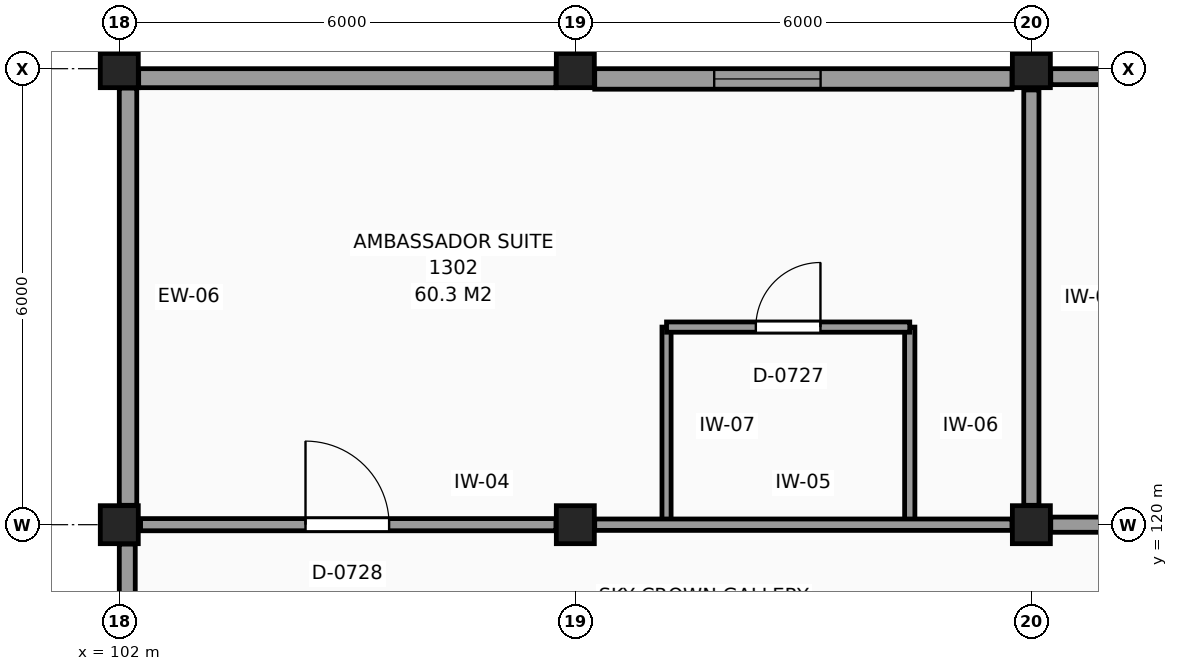
"""IFC4 building model, lengths in metres.
Left out: names, types, materials, properties, quantities, classifications, styles, units other than length and angle.
Written with IfcOpenShell. Run it as: python <this file> out.ifc"""

import sys

from ifc_helpers import new_model, si_unit, direction, frame, frame_2d, origin, origin_2d, place, context, subcontext, project, spatial, rectangle, extrude, element, fill, save


model = new_model("IFC4")
c1 = context("Model", 3, precision=1e-05, world=origin(), true_north=direction((0.0, 1.0)))
c2 = subcontext(c1, "Body", "Model", "MODEL_VIEW")
j1 = project(units=[si_unit("LENGTHUNIT", "METRE"), si_unit("PLANEANGLEUNIT", "RADIAN")], contexts=[c1])
p1 = place(None, origin())
s1 = spatial("IfcSite", under=j1, at=p1, CompositionType="ELEMENT")
p2 = place(p1, origin())
s2 = spatial("IfcBuilding", under=s1, at=p2, CompositionType="ELEMENT")
p3 = place(p2, frame((0.0, 0.0, 51.3)))
s3 = spatial("IfcBuildingStorey", under=s2, at=p3, CompositionType="ELEMENT", Elevation=51.3)
for number, where, z_axis, x_axis in (
    (1, (102.0, 120.0, 0.0), (0.0, 0.0, 1.0), (1.0, 0.0, 0.0)),
    (2, (102.0, 126.0, 0.0), (0.0, 0.0, 1.0), (1.0, 0.0, 0.0)),
    (3, (108.0, 120.0, 0.0), (0.0, 0.0, 1.0), (1.0, 0.0, 0.0)),
    (4, (108.0, 126.0, 0.0), (0.0, 0.0, 1.0), (1.0, 0.0, 0.0)),
    (5, (114.0, 120.0, 0.0), (0.0, 0.0, 1.0), (1.0, 0.0, 0.0)),
    (6, (114.0, 126.0, 0.0), (0.0, 0.0, 1.0), (1.0, 0.0, 0.0)),
):
    element("IfcColumn", number, at=place(p3, frame(where, z_axis=z_axis, x_axis=x_axis)), inside=s3, PredefinedType="COLUMN", context=c2, shape_type="SweptSolid", body=[
        extrude(rectangle(XDim=0.5, YDim=0.5, at=origin_2d()), origin(), (0.0, 0.0, 1.0), 3.3),
    ])
p4 = place(p3, frame((119.745, 125.895, 0.0), z_axis=(0.0, 0.0, 1.0), x_axis=(-1.0, 0.0, 0.0)))
e7 = element("IfcWall", 7, at=p4, inside=s3, PredefinedType="SOLIDWALL", context=c2, shape_type="SweptSolid", body=[
    extrude(rectangle(XDim=5.49, YDim=0.21, at=frame_2d((2.745, 0.0))), origin(), (0.0, 0.0, 1.0), 2.62),
])
p5 = place(p3, frame((113.745, 125.865, 0.0), z_axis=(0.0, 0.0, 1.0), x_axis=(-1.0, 0.0, 0.0)))
e8 = element("IfcWall", 8, at=p5, inside=s3, PredefinedType="SOLIDWALL", context=c2, shape_type="SweptSolid", body=[
    extrude(rectangle(XDim=5.49, YDim=0.27, at=frame_2d((2.745, 0.0))), origin(), (0.0, 0.0, 1.0), 2.51),
])
p6 = place(p5, frame((2.518, 0.0, 0.8)))
e9 = element("IfcOpeningElement", 9, at=p6, cuts=e8, PredefinedType="OPENING", context=c2, shape_type="SweptSolid", body=[
    extrude(rectangle(XDim=1.4, YDim=1.4, at=frame_2d((0.7, 0.7))), frame((0.0, 0.145, 0.0), z_axis=(0.0, -1.0, 0.0), x_axis=(1.0, 0.0, 0.0)), (0.0, 0.0, 1.0), 0.29),
])
p7 = place(p3, frame((107.745, 125.875, 0.0), z_axis=(0.0, 0.0, 1.0), x_axis=(-1.0, 0.0, 0.0)))
e10 = element("IfcWall", 10, at=p7, inside=s3, PredefinedType="SOLIDWALL", context=c2, shape_type="SweptSolid", body=[
    extrude(rectangle(XDim=5.49, YDim=0.25, at=frame_2d((2.745, 0.0))), origin(), (0.0, 0.0, 1.0), 2.62),
])
p8 = place(p3, frame((102.115, 125.745, 0.0), z_axis=(0.0, 0.0, 1.0), x_axis=(0.0, -1.0, 0.0)))
e11 = element("IfcWall", 11, at=p8, inside=s3, PredefinedType="SOLIDWALL", context=c2, shape_type="SweptSolid", body=[
    extrude(rectangle(XDim=5.49, YDim=0.23, at=frame_2d((2.745, 0.0))), origin(), (0.0, 0.0, 1.0), 2.46),
])
p9 = place(p3, frame((102.105, 119.745, 0.0), z_axis=(0.0, 0.0, 1.0), x_axis=(0.0, -1.0, 0.0)))
e12 = element("IfcWall", 12, at=p9, inside=s3, PredefinedType="SOLIDWALL", context=c2, shape_type="SweptSolid", body=[
    extrude(rectangle(XDim=5.49, YDim=0.21, at=frame_2d((2.745, 0.0))), origin(), (0.0, 0.0, 1.0), 2.61),
])
p10 = place(p3, frame((109.2, 120.0, 0.0), z_axis=(0.0, 0.0, 1.0), x_axis=(0.0, 1.0, 0.0)))
e13 = element("IfcWall", 13, at=p10, inside=s3, PredefinedType="PARTITIONING", context=c2, shape_type="SweptSolid", body=[
    extrude(rectangle(XDim=2.6, YDim=0.12, at=frame_2d((1.3, 0.0))), origin(), (0.0, 0.0, 1.0), 3.06),
])
p11 = place(p3, frame((112.4, 120.0, 0.0), z_axis=(0.0, 0.0, 1.0), x_axis=(0.0, 1.0, 0.0)))
e14 = element("IfcWall", 14, at=p11, inside=s3, PredefinedType="PARTITIONING", context=c2, shape_type="SweptSolid", body=[
    extrude(rectangle(XDim=2.6, YDim=0.135, at=frame_2d((1.3, 0.0))), origin(), (0.0, 0.0, 1.0), 3.06),
])
p12 = place(p3, frame((114.0, 120.255, 0.0), z_axis=(0.0, 0.0, 1.0), x_axis=(0.0, 1.0, 0.0)))
e15 = element("IfcWall", 15, at=p12, inside=s3, PredefinedType="PARTITIONING", context=c2, shape_type="SweptSolid", body=[
    extrude(rectangle(XDim=5.465, YDim=0.2, at=frame_2d((2.732, 0.0))), origin(), (0.0, 0.0, 1.0), 2.46),
])
p13 = place(p3, frame((102.28, 120.0, 0.0), z_axis=(0.0, 0.0, 1.0), x_axis=(1.0, 0.0, 0.0)))
e16 = element("IfcWall", 16, at=p13, inside=s3, PredefinedType="PARTITIONING", context=c2, shape_type="SweptSolid", body=[
    extrude(rectangle(XDim=5.465, YDim=0.16, at=frame_2d((2.732, 0.0))), origin(), (0.0, 0.0, 1.0), 2.62),
])
p14 = place(p13, frame((2.17, 0.0, 0.0)))
e17 = element("IfcOpeningElement", 17, at=p14, cuts=e16, PredefinedType="OPENING", context=c2, shape_type="SweptSolid", body=[
    extrude(rectangle(XDim=1.1, YDim=2.2, at=frame_2d((0.55, 1.1))), frame((0.0, 0.09, 0.0), z_axis=(0.0, -1.0, 0.0), x_axis=(1.0, 0.0, 0.0)), (0.0, 0.0, 1.0), 0.18),
])
p15 = place(p3, frame((108.255, 120.0, 0.0), z_axis=(0.0, 0.0, 1.0), x_axis=(1.0, 0.0, 0.0)))
e18 = element("IfcWall", 18, at=p15, inside=s3, PredefinedType="PARTITIONING", context=c2, shape_type="SweptSolid", body=[
    extrude(rectangle(XDim=5.49, YDim=0.15, at=frame_2d((2.745, 0.0))), origin(), (0.0, 0.0, 1.0), 2.51),
])
p16 = place(p3, frame((114.255, 120.0, 0.0), z_axis=(0.0, 0.0, 1.0), x_axis=(1.0, 0.0, 0.0)))
e19 = element("IfcWall", 19, at=p16, inside=s3, PredefinedType="PARTITIONING", context=c2, shape_type="SweptSolid", body=[
    extrude(rectangle(XDim=5.49, YDim=0.2, at=frame_2d((2.745, 0.0))), origin(), (0.0, 0.0, 1.0), 2.62),
])
p17 = place(p16, frame((2.195, 0.0, 0.0)))
e20 = element("IfcOpeningElement", 20, at=p17, cuts=e19, PredefinedType="OPENING", context=c2, shape_type="SweptSolid", body=[
    extrude(rectangle(XDim=1.1, YDim=2.2, at=frame_2d((0.55, 1.1))), frame((0.0, 0.11, 0.0), z_axis=(0.0, -1.0, 0.0), x_axis=(1.0, 0.0, 0.0)), (0.0, 0.0, 1.0), 0.22),
])
p18 = place(p3, frame((109.2, 122.6, 0.0), z_axis=(0.0, 0.0, 1.0), x_axis=(1.0, 0.0, 0.0)))
e21 = element("IfcWall", 21, at=p18, inside=s3, PredefinedType="PARTITIONING", context=c2, shape_type="SweptSolid", body=[
    extrude(rectangle(XDim=3.2, YDim=0.135, at=frame_2d((1.6, 0.0))), origin(), (0.0, 0.0, 1.0), 3.06),
])
p19 = place(p18, frame((1.175, 0.0, 0.0)))
e22 = element("IfcOpeningElement", 22, at=p19, cuts=e21, PredefinedType="OPENING", context=c2, shape_type="SweptSolid", body=[
    extrude(rectangle(XDim=0.85, YDim=2.1, at=frame_2d((0.425, 1.05))), frame((0.0, 0.078, 0.0), z_axis=(0.0, -1.0, 0.0), x_axis=(1.0, 0.0, 0.0)), (0.0, 0.0, 1.0), 0.155),
])
p20 = place(p6, origin())
e23 = element("IfcWindow", 23, at=p20, inside=s3, PartitioningType="SINGLE_PANEL", PredefinedType="WINDOW", context=c2, shape_type="SweptSolid", body=[
    extrude(rectangle(XDim=1.4, YDim=1.4, at=frame_2d((0.7, 0.7))), frame((0.0, 0.03, 0.0), z_axis=(0.0, -1.0, 0.0), x_axis=(1.0, 0.0, 0.0)), (0.0, 0.0, 1.0), 0.06),
])
fill(e9, e23)
p21 = place(p19, origin())
e24 = element("IfcDoor", 24, at=p21, inside=s3, OperationType="SINGLE_SWING_RIGHT", PredefinedType="DOOR", context=c2, shape_type="SweptSolid", body=[
    extrude(rectangle(XDim=0.85, YDim=2.1, at=frame_2d((0.425, 1.05))), frame((0.0, 0.025, 0.0), z_axis=(0.0, -1.0, 0.0), x_axis=(1.0, 0.0, 0.0)), (0.0, 0.0, 1.0), 0.05),
])
fill(e22, e24)
p22 = place(p14, origin())
e25 = element("IfcDoor", 25, at=p22, inside=s3, OperationType="SINGLE_SWING_LEFT", PredefinedType="DOOR", context=c2, shape_type="SweptSolid", body=[
    extrude(rectangle(XDim=1.1, YDim=2.2, at=frame_2d((0.55, 1.1))), frame((0.0, 0.025, 0.0), z_axis=(0.0, -1.0, 0.0), x_axis=(1.0, 0.0, 0.0)), (0.0, 0.0, 1.0), 0.05),
])
fill(e17, e25)
save(model, sys.argv[1])
